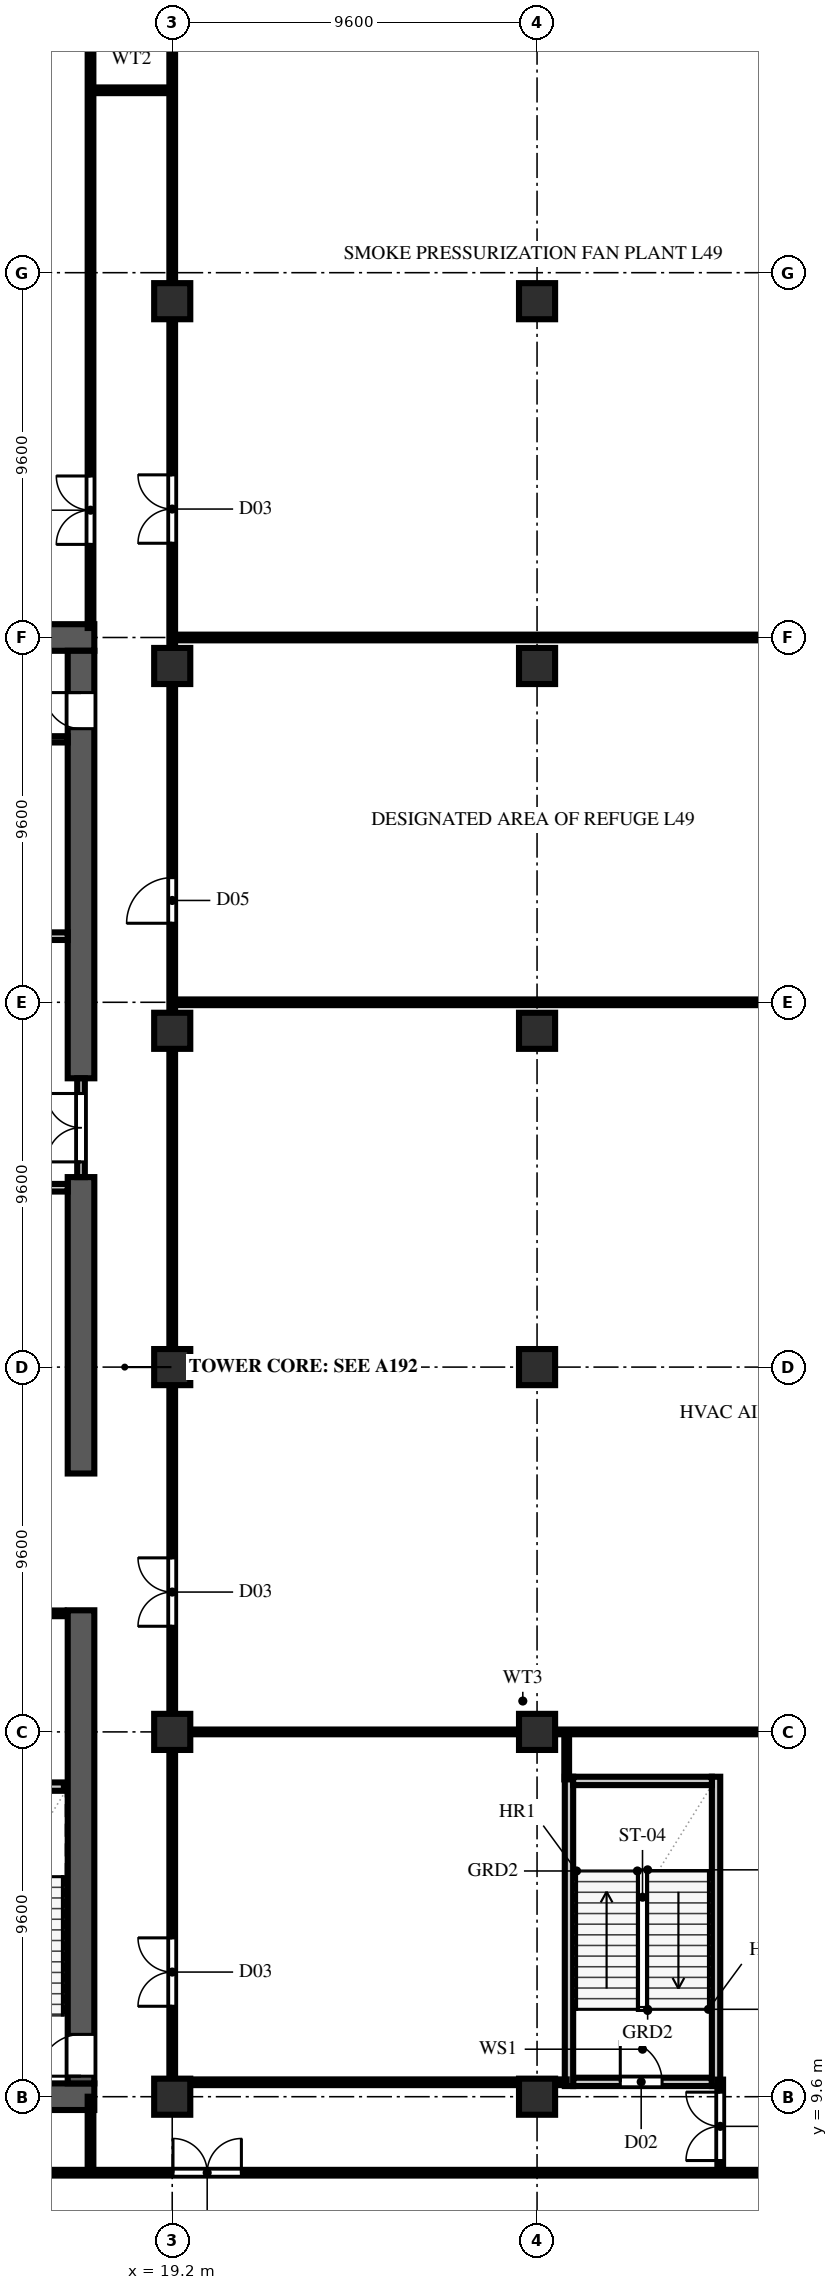
"""IFC4 building model, lengths in metres.
Left out: names, types, materials, properties, quantities, classifications, styles, units other than length and angle.
Written with IfcOpenShell. Run it as: python <this file> out.ifc"""

import sys

from ifc_helpers import new_model, si_unit, direction, frame, frame_2d, origin, origin_2d, place, context, subcontext, project, spatial, rectangle, extrude, element, fill, save


model = new_model("IFC4")
c1 = context("Model", 3, precision=1e-05, world=origin(), true_north=direction((0.0, 1.0)))
c2 = subcontext(c1, "Body", "Model", "MODEL_VIEW")
j1 = project(units=[si_unit("LENGTHUNIT", "METRE"), si_unit("PLANEANGLEUNIT", "RADIAN")], contexts=[c1])
p1 = place(None, origin())
s1 = spatial("IfcSite", under=j1, at=p1, CompositionType="ELEMENT")
p2 = place(p1, origin())
s2 = spatial("IfcBuilding", under=s1, at=p2, CompositionType="ELEMENT")
p3 = place(p2, frame((0.0, 0.0, 194.0)))
s3 = spatial("IfcBuildingStorey", under=s2, at=p3, CompositionType="ELEMENT", Elevation=194.0)
for number, where, z_axis, x_axis in (
    (1, (2.55, 9.6, 0.0), (0.0, 0.0, 1.0), (1.0, 0.0, 0.0)),
    (2, (2.55, 48.0, 0.0), (0.0, 0.0, 1.0), (1.0, 0.0, 0.0)),
):
    element("IfcWall", number, at=place(p3, frame(where, z_axis=z_axis, x_axis=x_axis)), inside=s3, PredefinedType="SHEAR", context=c2, shape_type="SweptSolid", body=[
        extrude(rectangle(XDim=14.6, YDim=0.7, at=frame_2d((7.3, 0.0))), origin(), (0.0, 0.0, 1.0), 4.74),
    ])
p4 = place(p3, frame((16.8, 9.95, 0.0), z_axis=(0.0, 0.0, 1.0), x_axis=(0.0, 1.0, 0.0)))
e3 = element("IfcWall", 3, at=p4, inside=s3, PredefinedType="SHEAR", context=c2, shape_type="SweptSolid", body=[
    extrude(rectangle(XDim=12.45, YDim=0.7, at=frame_2d((6.225, 0.0))), origin(), (0.0, 0.0, 1.0), 4.74),
])
p5 = place(p4, frame((0.19, 0.0, 0.0)))
e4 = element("IfcOpeningElement", 4, at=p5, cuts=e3, PredefinedType="OPENING", context=c2, shape_type="SweptSolid", body=[
    extrude(rectangle(XDim=1.1, YDim=2.2, at=frame_2d((0.55, 1.1))), frame((0.0, 0.362, 0.0), z_axis=(0.0, -1.0, 0.0), x_axis=(1.0, 0.0, 0.0)), (0.0, 0.0, 1.0), 0.724),
])
p6 = place(p3, frame((16.8, 26.0, 0.0), z_axis=(0.0, 0.0, 1.0), x_axis=(0.0, 1.0, 0.0)))
e5 = element("IfcWall", 5, at=p6, inside=s3, PredefinedType="SHEAR", context=c2, shape_type="SweptSolid", body=[
    extrude(rectangle(XDim=7.8, YDim=0.7, at=frame_2d((3.9, 0.0))), origin(), (0.0, 0.0, 1.0), 4.74),
])
p7 = place(p3, frame((16.8, 36.4, 0.0), z_axis=(0.0, 0.0, 1.0), x_axis=(0.0, 1.0, 0.0)))
e6 = element("IfcWall", 6, at=p7, inside=s3, PredefinedType="SHEAR", context=c2, shape_type="SweptSolid", body=[
    extrude(rectangle(XDim=11.25, YDim=0.7, at=frame_2d((5.625, 0.0))), origin(), (0.0, 0.0, 1.0), 4.74),
])
p8 = place(p7, frame((9.2, 0.0, 0.0)))
e7 = element("IfcOpeningElement", 7, at=p8, cuts=e6, PredefinedType="OPENING", context=c2, shape_type="SweptSolid", body=[
    extrude(rectangle(XDim=0.95, YDim=2.15, at=frame_2d((0.475, 1.075))), frame((0.0, 0.362, 0.0), z_axis=(0.0, -1.0, 0.0), x_axis=(1.0, 0.0, 0.0)), (0.0, 0.0, 1.0), 0.724),
])
for number, where, z_axis, x_axis in (
    (8, (19.2, 9.6, 0.0), (0.0, 0.0, 1.0), (1.0, 0.0, 0.0)),
    (9, (19.2, 19.2, 0.0), (0.0, 0.0, 1.0), (1.0, 0.0, 0.0)),
    (10, (19.2, 28.8, 0.0), (0.0, 0.0, 1.0), (1.0, 0.0, 0.0)),
    (11, (19.2, 37.65, 0.0), (0.0, 0.0, 1.0), (1.0, 0.0, 0.0)),
    (12, (19.2, 47.25, 0.0), (0.0, 0.0, 1.0), (1.0, 0.0, 0.0)),
    (13, (19.2, 56.85, 0.0), (0.0, 0.0, 1.0), (1.0, 0.0, 0.0)),
    (14, (28.8, 9.6, 0.0), (0.0, 0.0, 1.0), (1.0, 0.0, 0.0)),
    (15, (28.8, 19.2, 0.0), (0.0, 0.0, 1.0), (1.0, 0.0, 0.0)),
    (16, (28.8, 28.8, 0.0), (0.0, 0.0, 1.0), (1.0, 0.0, 0.0)),
    (17, (28.8, 37.65, 0.0), (0.0, 0.0, 1.0), (1.0, 0.0, 0.0)),
    (18, (28.8, 47.25, 0.0), (0.0, 0.0, 1.0), (1.0, 0.0, 0.0)),
    (19, (28.8, 56.85, 0.0), (0.0, 0.0, 1.0), (1.0, 0.0, 0.0)),
):
    element("IfcColumn", number, at=place(p3, frame(where, z_axis=z_axis, x_axis=x_axis)), inside=s3, PredefinedType="COLUMN", context=c2, shape_type="SweptSolid", body=[
        extrude(rectangle(XDim=0.95, YDim=0.95, at=origin_2d()), origin(), (0.0, 0.0, 1.0), 5.0),
    ])
p9 = place(p3, frame((12.75, 17.76, 0.0), z_axis=(0.0, 0.0, 1.0), x_axis=(1.0, 0.0, 0.0)))
e20 = element("IfcWall", 20, at=p9, inside=s3, PredefinedType="SOLIDWALL", context=c2, shape_type="SweptSolid", body=[
    extrude(rectangle(XDim=3.6, YDim=0.22, at=frame_2d((1.8, 0.0))), origin(), (0.0, 0.0, 1.0), 4.74),
])
p10 = place(p3, frame((29.75, 9.99, 0.0), z_axis=(0.0, 0.0, 1.0), x_axis=(1.0, 0.0, 0.0)))
e21 = element("IfcWall", 21, at=p10, inside=s3, PredefinedType="SOLIDWALL", context=c2, shape_type="SweptSolid", body=[
    extrude(rectangle(XDim=3.65, YDim=0.22, at=frame_2d((1.825, 0.0))), origin(), (0.0, 0.0, 1.0), 4.74),
])
p11 = place(p10, frame((1.24, 0.0, 0.0)))
e22 = element("IfcOpeningElement", 22, at=p11, cuts=e21, PredefinedType="OPENING", context=c2, shape_type="SweptSolid", body=[
    extrude(rectangle(XDim=1.1, YDim=2.2, at=frame_2d((0.55, 1.1))), frame((0.0, 0.122, 0.0), z_axis=(0.0, -1.0, 0.0), x_axis=(1.0, 0.0, 0.0)), (0.0, 0.0, 1.0), 0.244),
])
for number, where, z_axis, x_axis in (
    (23, (29.64, 9.88, 0.0), (0.0, 0.0, 1.0), (0.0, 1.0, 0.0)),
    (24, (33.51, 9.88, 0.0), (0.0, 0.0, 1.0), (0.0, 1.0, 0.0)),
):
    element("IfcWall", number, at=place(p3, frame(where, z_axis=z_axis, x_axis=x_axis)), inside=s3, PredefinedType="SOLIDWALL", context=c2, shape_type="SweptSolid", body=[
        extrude(rectangle(XDim=8.14, YDim=0.22, at=frame_2d((4.07, 0.0))), origin(), (0.0, 0.0, 1.0), 4.74),
    ])
p12 = place(p3, frame((29.75, 17.91, 0.0), z_axis=(0.0, 0.0, 1.0), x_axis=(1.0, 0.0, 0.0)))
e25 = element("IfcWall", 25, at=p12, inside=s3, PredefinedType="SOLIDWALL", context=c2, shape_type="SweptSolid", body=[
    extrude(rectangle(XDim=3.65, YDim=0.22, at=frame_2d((1.825, 0.0))), origin(), (0.0, 0.0, 1.0), 4.74),
])
p13 = place(p3, frame((13.12, 33.52, 0.0), z_axis=(0.0, 0.0, 1.0), x_axis=(1.0, 0.0, 0.0)))
e26 = element("IfcWall", 26, at=p13, inside=s3, PredefinedType="SOLIDWALL", context=c2, shape_type="SweptSolid", body=[
    extrude(rectangle(XDim=3.33, YDim=0.2, at=frame_2d((1.665, 0.0))), origin(), (0.0, 0.0, 1.0), 4.74),
])
p14 = place(p3, frame((6.32, 40.14, 0.0), z_axis=(0.0, 0.0, 1.0), x_axis=(1.0, 0.0, 0.0)))
e27 = element("IfcWall", 27, at=p14, inside=s3, PredefinedType="SOLIDWALL", context=c2, shape_type="SweptSolid", body=[
    extrude(rectangle(XDim=10.13, YDim=0.2, at=frame_2d((5.065, 0.0))), origin(), (0.0, 0.0, 1.0), 4.74),
])
p15 = place(p3, frame((16.8, 33.8, 0.0), z_axis=(0.0, 0.0, 1.0), x_axis=(0.0, 1.0, 0.0)))
e28 = element("IfcWall", 28, at=p15, inside=s3, PredefinedType="SOLIDWALL", context=c2, shape_type="SweptSolid", body=[
    extrude(rectangle(XDim=2.6, YDim=0.2, at=frame_2d((1.3, 0.0))), origin(), (0.0, 0.0, 1.0), 4.74),
])
p16 = place(p15, frame((0.4, 0.0, 0.0)))
e29 = element("IfcOpeningElement", 29, at=p16, cuts=e28, PredefinedType="OPENING", context=c2, shape_type="SweptSolid", body=[
    extrude(rectangle(XDim=1.8, YDim=2.2, at=frame_2d((0.9, 1.1))), frame((0.0, 0.112, 0.0), z_axis=(0.0, -1.0, 0.0), x_axis=(1.0, 0.0, 0.0)), (0.0, 0.0, 1.0), 0.224),
])
p17 = place(p3, frame((13.225, 22.32, 0.0), z_axis=(0.0, 0.0, 1.0), x_axis=(1.0, 0.0, 0.0)))
e30 = element("IfcWall", 30, at=p17, inside=s3, PredefinedType="PARTITIONING", context=c2, shape_type="SweptSolid", body=[
    extrude(rectangle(XDim=3.12, YDim=0.15, at=frame_2d((1.56, 0.0))), origin(), (0.0, 0.0, 1.0), 4.74),
])
p18 = place(p17, frame((1.0, 0.0, 0.0)))
e31 = element("IfcOpeningElement", 31, at=p18, cuts=e30, PredefinedType="OPENING", context=c2, shape_type="SweptSolid", body=[
    extrude(rectangle(XDim=0.85, YDim=2.1, at=frame_2d((0.425, 1.05))), frame((0.0, 0.087, 0.0), z_axis=(0.0, -1.0, 0.0), x_axis=(1.0, 0.0, 0.0)), (0.0, 0.0, 1.0), 0.174),
])
p19 = place(p3, frame((6.32, 45.32, 0.0), z_axis=(0.0, 0.0, 1.0), x_axis=(1.0, 0.0, 0.0)))
e32 = element("IfcWall", 32, at=p19, inside=s3, PredefinedType="PLUMBINGWALL", context=c2, shape_type="SweptSolid", body=[
    extrude(rectangle(XDim=10.13, YDim=0.165, at=frame_2d((5.065, 0.0))), origin(), (0.0, 0.0, 1.0), 4.74),
])
p20 = place(p19, frame((0.9, 0.0, 0.0)))
e33 = element("IfcOpeningElement", 33, at=p20, cuts=e32, PredefinedType="OPENING", context=c2, shape_type="SweptSolid", body=[
    extrude(rectangle(XDim=0.92, YDim=2.15, at=frame_2d((0.46, 1.075))), frame((0.0, 0.094, 0.0), z_axis=(0.0, -1.0, 0.0), x_axis=(1.0, 0.0, 0.0)), (0.0, 0.0, 1.0), 0.189),
])
p21 = place(p19, frame((4.6, 0.0, 0.0)))
e34 = element("IfcOpeningElement", 34, at=p21, cuts=e32, PredefinedType="OPENING", context=c2, shape_type="SweptSolid", body=[
    extrude(rectangle(XDim=0.92, YDim=2.15, at=frame_2d((0.46, 1.075))), frame((0.0, 0.094, 0.0), z_axis=(0.0, -1.0, 0.0), x_axis=(1.0, 0.0, 0.0)), (0.0, 0.0, 1.0), 0.189),
])
p22 = place(p19, frame((8.1, 0.0, 0.0)))
e35 = element("IfcOpeningElement", 35, at=p22, cuts=e32, PredefinedType="OPENING", context=c2, shape_type="SweptSolid", body=[
    extrude(rectangle(XDim=0.92, YDim=2.15, at=frame_2d((0.46, 1.075))), frame((0.0, 0.094, 0.0), z_axis=(0.0, -1.0, 0.0), x_axis=(1.0, 0.0, 0.0)), (0.0, 0.0, 1.0), 0.189),
])
p23 = place(p3, frame((17.05, 7.6, 0.0), z_axis=(0.0, 0.0, 1.0), x_axis=(0.0, 1.0, 0.0)))
e36 = element("IfcWall", 36, at=p23, inside=s3, PredefinedType="PARTITIONING", context=c2, shape_type="SweptSolid", body=[
    extrude(rectangle(XDim=2.0, YDim=0.15, at=frame_2d((1.0, 0.0))), origin(), (0.0, 0.0, 1.0), 4.74),
])
p24 = place(p3, frame((17.05, 62.4, 0.0), z_axis=(0.0, 0.0, 1.0), x_axis=(1.0, 0.0, 0.0)))
e37 = element("IfcWall", 37, at=p24, inside=s3, PredefinedType="PARTITIONING", context=c2, shape_type="SweptSolid", body=[
    extrude(rectangle(XDim=2.15, YDim=0.15, at=frame_2d((1.075, 0.0))), origin(), (0.0, 0.0, 1.0), 4.7),
])
p25 = place(p3, frame((0.22, 7.6, 0.0), z_axis=(0.0, 0.0, 1.0), x_axis=(1.0, 0.0, 0.0)))
e38 = element("IfcWall", 38, at=p25, inside=s3, PredefinedType="PARTITIONING", context=c2, shape_type="SweptSolid", body=[
    extrude(rectangle(XDim=57.16, YDim=0.15, at=frame_2d((28.58, 0.0))), origin(), (0.0, 0.0, 1.0), 4.74),
])
p26 = place(p25, frame((19.0, 0.0, 0.0)))
e39 = element("IfcOpeningElement", 39, at=p26, cuts=e38, PredefinedType="OPENING", context=c2, shape_type="SweptSolid", body=[
    extrude(rectangle(XDim=1.8, YDim=2.2, at=frame_2d((0.9, 1.1))), frame((0.0, 0.087, 0.0), z_axis=(0.0, -1.0, 0.0), x_axis=(1.0, 0.0, 0.0)), (0.0, 0.0, 1.0), 0.174),
])
p27 = place(p3, frame((33.62, 7.6, 0.0), z_axis=(0.0, 0.0, 1.0), x_axis=(0.0, 1.0, 0.0)))
e40 = element("IfcWall", 40, at=p27, inside=s3, PredefinedType="PARTITIONING", context=c2, shape_type="SweptSolid", body=[
    extrude(rectangle(XDim=2.45, YDim=0.15, at=frame_2d((1.225, 0.0))), origin(), (0.0, 0.0, 1.0), 4.74),
])
p28 = place(p27, frame((0.32, 0.0, 0.0)))
e41 = element("IfcOpeningElement", 41, at=p28, cuts=e40, PredefinedType="OPENING", context=c2, shape_type="SweptSolid", body=[
    extrude(rectangle(XDim=1.8, YDim=2.2, at=frame_2d((0.9, 1.1))), frame((0.0, 0.087, 0.0), z_axis=(0.0, -1.0, 0.0), x_axis=(1.0, 0.0, 0.0)), (0.0, 0.0, 1.0), 0.174),
])
p29 = place(p3, frame((19.2, 9.98, 0.0), z_axis=(0.0, 0.0, 1.0), x_axis=(1.0, 0.0, 0.0)))
e42 = element("IfcWall", 42, at=p29, inside=s3, PredefinedType="PARTITIONING", context=c2, shape_type="SweptSolid", body=[
    extrude(rectangle(XDim=10.38, YDim=0.15, at=frame_2d((5.19, 0.0))), origin(), (0.0, 0.0, 1.0), 4.74),
])
p30 = place(p3, frame((29.58, 17.95, 0.0), z_axis=(0.0, 0.0, 1.0), x_axis=(0.0, 1.0, 0.0)))
e43 = element("IfcWall", 43, at=p30, inside=s3, PredefinedType="PARTITIONING", context=c2, shape_type="SweptSolid", body=[
    extrude(rectangle(XDim=1.25, YDim=0.125, at=frame_2d((0.625, 0.0))), origin(), (0.0, 0.0, 1.0), 4.74),
])
p31 = place(p3, frame((19.2, 19.2, 0.0), z_axis=(0.0, 0.0, 1.0), x_axis=(1.0, 0.0, 0.0)))
e44 = element("IfcWall", 44, at=p31, inside=s3, PredefinedType="PARTITIONING", context=c2, shape_type="SweptSolid", body=[
    extrude(rectangle(XDim=18.45, YDim=0.125, at=frame_2d((9.225, 0.0))), origin(), (0.0, 0.0, 1.0), 2.323),
])
for number, where, z_axis, x_axis in (
    (45, (19.2, 38.4, 0.0), (0.0, 0.0, 1.0), (1.0, 0.0, 0.0)),
    (46, (19.2, 48.0, 0.0), (0.0, 0.0, 1.0), (1.0, 0.0, 0.0)),
):
    element("IfcWall", number, at=place(p3, frame(where, z_axis=z_axis, x_axis=x_axis)), inside=s3, PredefinedType="PARTITIONING", context=c2, shape_type="SweptSolid", body=[
        extrude(rectangle(XDim=18.98, YDim=0.15, at=frame_2d((9.49, 0.0))), origin(), (0.0, 0.0, 1.0), 4.74),
    ])
p32 = place(p3, frame((19.2, 9.98, 0.0), z_axis=(0.0, 0.0, 1.0), x_axis=(0.0, 1.0, 0.0)))
e47 = element("IfcWall", 47, at=p32, inside=s3, PredefinedType="PARTITIONING", context=c2, shape_type="SweptSolid", body=[
    extrude(rectangle(XDim=46.87, YDim=0.15, at=frame_2d((23.435, 0.0))), origin(), (0.0, 0.0, 1.0), 3.967),
])
p33 = place(p32, frame((2.0, 0.0, 0.0)))
e48 = element("IfcOpeningElement", 48, at=p33, cuts=e47, PredefinedType="OPENING", context=c2, shape_type="SweptSolid", body=[
    extrude(rectangle(XDim=1.8, YDim=2.2, at=frame_2d((0.9, 1.1))), frame((0.0, 0.087, 0.0), z_axis=(0.0, -1.0, 0.0), x_axis=(1.0, 0.0, 0.0)), (0.0, 0.0, 1.0), 0.174),
])
p34 = place(p32, frame((12.0, 0.0, 0.0)))
e49 = element("IfcOpeningElement", 49, at=p34, cuts=e47, PredefinedType="OPENING", context=c2, shape_type="SweptSolid", body=[
    extrude(rectangle(XDim=1.8, YDim=2.2, at=frame_2d((0.9, 1.1))), frame((0.0, 0.087, 0.0), z_axis=(0.0, -1.0, 0.0), x_axis=(1.0, 0.0, 0.0)), (0.0, 0.0, 1.0), 0.174),
])
p35 = place(p32, frame((30.5, 0.0, 0.0)))
e50 = element("IfcOpeningElement", 50, at=p35, cuts=e47, PredefinedType="OPENING", context=c2, shape_type="SweptSolid", body=[
    extrude(rectangle(XDim=1.2, YDim=2.2, at=frame_2d((0.6, 1.1))), frame((0.0, 0.087, 0.0), z_axis=(0.0, -1.0, 0.0), x_axis=(1.0, 0.0, 0.0)), (0.0, 0.0, 1.0), 0.174),
])
p36 = place(p32, frame((40.5, 0.0, 0.0)))
e51 = element("IfcOpeningElement", 51, at=p36, cuts=e47, PredefinedType="OPENING", context=c2, shape_type="SweptSolid", body=[
    extrude(rectangle(XDim=1.8, YDim=2.2, at=frame_2d((0.9, 1.1))), frame((0.0, 0.087, 0.0), z_axis=(0.0, -1.0, 0.0), x_axis=(1.0, 0.0, 0.0)), (0.0, 0.0, 1.0), 0.174),
])
p37 = place(p3, frame((19.2, 56.85, 0.0), z_axis=(0.0, 0.0, 1.0), x_axis=(0.0, 1.0, 0.0)))
e52 = element("IfcWall", 52, at=p37, inside=s3, PredefinedType="PARTITIONING", context=c2, shape_type="SweptSolid", body=[
    extrude(rectangle(XDim=9.6, YDim=0.15, at=frame_2d((4.8, 0.0))), origin(), (0.0, 0.0, 1.0), 3.927),
])
p38 = place(p3, frame((17.05, 48.25, 0.0), z_axis=(0.0, 0.0, 1.0), x_axis=(0.0, 1.0, 0.0)))
e53 = element("IfcWall", 53, at=p38, inside=s3, PredefinedType="PARTITIONING", context=c2, shape_type="SweptSolid", body=[
    extrude(rectangle(XDim=18.73, YDim=0.15, at=frame_2d((9.365, 0.0))), origin(), (0.0, 0.0, 1.0), 4.7),
])
p39 = place(p38, frame((2.2, 0.0, 0.0)))
e54 = element("IfcOpeningElement", 54, at=p39, cuts=e53, PredefinedType="OPENING", context=c2, shape_type="SweptSolid", body=[
    extrude(rectangle(XDim=1.8, YDim=2.2, at=frame_2d((0.9, 1.1))), frame((0.0, 0.087, 0.0), z_axis=(0.0, -1.0, 0.0), x_axis=(1.0, 0.0, 0.0)), (0.0, 0.0, 1.0), 0.174),
])
p40 = place(p5, origin())
e55 = element("IfcDoor", 55, at=p40, inside=s3, OperationType="SINGLE_SWING_LEFT", PredefinedType="DOOR", context=c2, shape_type="SweptSolid", body=[
    extrude(rectangle(XDim=1.1, YDim=2.2, at=frame_2d((0.55, 1.1))), frame((0.0, 0.025, 0.0), z_axis=(0.0, -1.0, 0.0), x_axis=(1.0, 0.0, 0.0)), (0.0, 0.0, 1.0), 0.05),
])
fill(e4, e55)
p41 = place(p11, origin())
e56 = element("IfcDoor", 56, at=p41, inside=s3, OperationType="SINGLE_SWING_LEFT", PredefinedType="DOOR", context=c2, shape_type="SweptSolid", body=[
    extrude(rectangle(XDim=1.1, YDim=2.2, at=frame_2d((0.55, 1.1))), frame((0.0, 0.025, 0.0), z_axis=(0.0, -1.0, 0.0), x_axis=(1.0, 0.0, 0.0)), (0.0, 0.0, 1.0), 0.05),
])
fill(e22, e56)
p42 = place(p8, origin())
e57 = element("IfcDoor", 57, at=p42, inside=s3, OperationType="SINGLE_SWING_RIGHT", PredefinedType="DOOR", context=c2, shape_type="SweptSolid", body=[
    extrude(rectangle(XDim=0.95, YDim=2.15, at=frame_2d((0.475, 1.075))), frame((0.0, 0.025, 0.0), z_axis=(0.0, -1.0, 0.0), x_axis=(1.0, 0.0, 0.0)), (0.0, 0.0, 1.0), 0.05),
])
fill(e7, e57)
p43 = place(p16, origin())
e58 = element("IfcDoor", 58, at=p43, inside=s3, OperationType="DOUBLE_DOOR_SINGLE_SWING", PredefinedType="DOOR", context=c2, shape_type="SweptSolid", body=[
    extrude(rectangle(XDim=1.8, YDim=2.2, at=frame_2d((0.9, 1.1))), frame((0.0, 0.025, 0.0), z_axis=(0.0, -1.0, 0.0), x_axis=(1.0, 0.0, 0.0)), (0.0, 0.0, 1.0), 0.05),
])
fill(e29, e58)
p44 = place(p26, origin())
e59 = element("IfcDoor", 59, at=p44, inside=s3, OperationType="DOUBLE_DOOR_SINGLE_SWING", PredefinedType="DOOR", context=c2, shape_type="SweptSolid", body=[
    extrude(rectangle(XDim=1.8, YDim=2.2, at=frame_2d((0.9, 1.1))), frame((0.0, 0.025, 0.0), z_axis=(0.0, -1.0, 0.0), x_axis=(1.0, 0.0, 0.0)), (0.0, 0.0, 1.0), 0.05),
])
fill(e39, e59)
p45 = place(p28, origin())
e60 = element("IfcDoor", 60, at=p45, inside=s3, OperationType="DOUBLE_DOOR_SINGLE_SWING", PredefinedType="DOOR", context=c2, shape_type="SweptSolid", body=[
    extrude(rectangle(XDim=1.8, YDim=2.2, at=frame_2d((0.9, 1.1))), frame((0.0, 0.025, 0.0), z_axis=(0.0, -1.0, 0.0), x_axis=(1.0, 0.0, 0.0)), (0.0, 0.0, 1.0), 0.05),
])
fill(e41, e60)
p46 = place(p33, origin())
e61 = element("IfcDoor", 61, at=p46, inside=s3, OperationType="DOUBLE_DOOR_SINGLE_SWING", PredefinedType="DOOR", context=c2, shape_type="SweptSolid", body=[
    extrude(rectangle(XDim=1.8, YDim=2.2, at=frame_2d((0.9, 1.1))), frame((0.0, 0.025, 0.0), z_axis=(0.0, -1.0, 0.0), x_axis=(1.0, 0.0, 0.0)), (0.0, 0.0, 1.0), 0.05),
])
fill(e48, e61)
p47 = place(p34, origin())
e62 = element("IfcDoor", 62, at=p47, inside=s3, OperationType="DOUBLE_DOOR_SINGLE_SWING", PredefinedType="DOOR", context=c2, shape_type="SweptSolid", body=[
    extrude(rectangle(XDim=1.8, YDim=2.2, at=frame_2d((0.9, 1.1))), frame((0.0, 0.025, 0.0), z_axis=(0.0, -1.0, 0.0), x_axis=(1.0, 0.0, 0.0)), (0.0, 0.0, 1.0), 0.05),
])
fill(e49, e62)
p48 = place(p35, origin())
e63 = element("IfcDoor", 63, at=p48, inside=s3, OperationType="SINGLE_SWING_LEFT", PredefinedType="DOOR", context=c2, shape_type="SweptSolid", body=[
    extrude(rectangle(XDim=1.2, YDim=2.2, at=frame_2d((0.6, 1.1))), frame((0.0, 0.025, 0.0), z_axis=(0.0, -1.0, 0.0), x_axis=(1.0, 0.0, 0.0)), (0.0, 0.0, 1.0), 0.05),
])
fill(e50, e63)
p49 = place(p36, origin())
e64 = element("IfcDoor", 64, at=p49, inside=s3, OperationType="DOUBLE_DOOR_SINGLE_SWING", PredefinedType="DOOR", context=c2, shape_type="SweptSolid", body=[
    extrude(rectangle(XDim=1.8, YDim=2.2, at=frame_2d((0.9, 1.1))), frame((0.0, 0.025, 0.0), z_axis=(0.0, -1.0, 0.0), x_axis=(1.0, 0.0, 0.0)), (0.0, 0.0, 1.0), 0.05),
])
fill(e51, e64)
p50 = place(p39, origin())
e65 = element("IfcDoor", 65, at=p50, inside=s3, OperationType="DOUBLE_DOOR_SINGLE_SWING", PredefinedType="DOOR", context=c2, shape_type="SweptSolid", body=[
    extrude(rectangle(XDim=1.8, YDim=2.2, at=frame_2d((0.9, 1.1))), frame((0.0, 0.025, 0.0), z_axis=(0.0, -1.0, 0.0), x_axis=(1.0, 0.0, 0.0)), (0.0, 0.0, 1.0), 0.05),
])
fill(e54, e65)
save(model, sys.argv[1])
